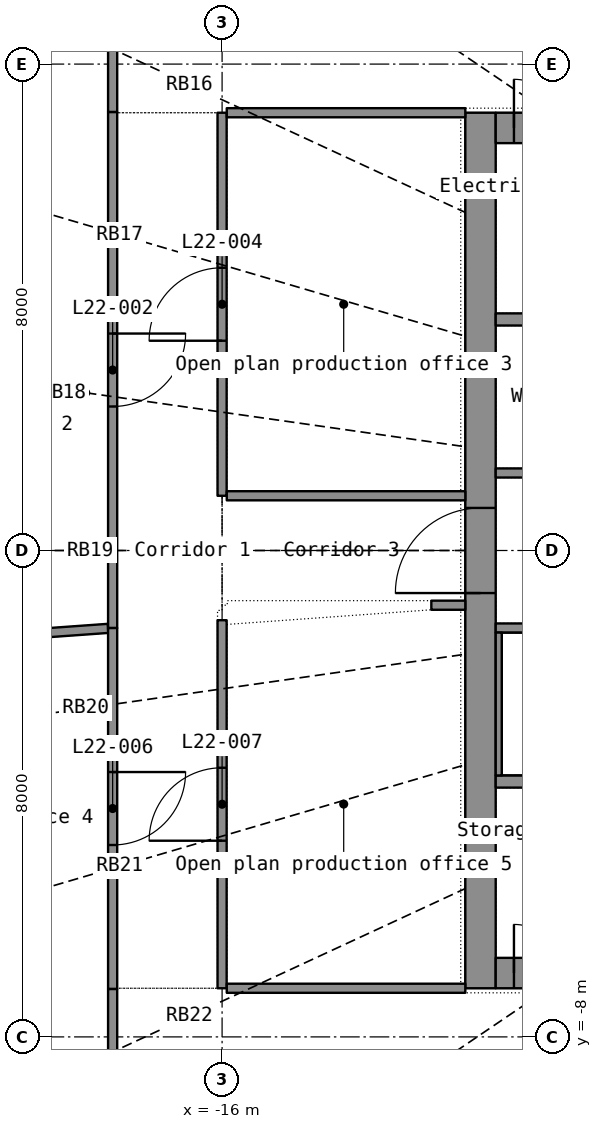
"""IFC4 building model, lengths in metres.
Left out: names, types, materials, properties, quantities, classifications, styles, units other than length and angle.
Written with IfcOpenShell. Run it as: python <this file> out.ifc"""

import sys

from ifc_helpers import new_model, si_unit, direction, frame, frame_2d, origin, place, context, subcontext, project, spatial, rectangle, extrude, element, fill, save


model = new_model("IFC4")
c1 = context("Model", 3, precision=1e-05, world=origin(), true_north=direction((0.0, 1.0)))
c2 = subcontext(c1, "Body", "Model", "MODEL_VIEW")
j1 = project(units=[si_unit("LENGTHUNIT", "METRE"), si_unit("PLANEANGLEUNIT", "RADIAN")], contexts=[c1])
p1 = place(None, origin())
s1 = spatial("IfcSite", under=j1, at=p1, CompositionType="ELEMENT")
p2 = place(p1, origin())
s2 = spatial("IfcBuilding", under=s1, at=p2, CompositionType="ELEMENT")
p3 = place(p2, frame((0.0, 0.0, 97.1)))
s3 = spatial("IfcBuildingStorey", under=s2, at=p3, CompositionType="ELEMENT", Elevation=97.1)
p4 = place(p3, frame((-11.75, -7.2, 0.0), z_axis=(0.0, 0.0, 1.0), x_axis=(0.0, 1.0, 0.0)))
e1 = element("IfcWall", 1, at=p4, inside=s3, PredefinedType="SHEAR", context=c2, shape_type="SweptSolid", body=[
    extrude(rectangle(XDim=14.4, YDim=0.5, at=frame_2d((7.2, 0.0))), origin(), (0.0, 0.0, 1.0), 3.3),
])
p5 = place(p4, frame((6.5, 0.0, 0.0)))
e2 = element("IfcOpeningElement", 2, at=p5, cuts=e1, PredefinedType="OPENING", context=c2, shape_type="SweptSolid", body=[
    extrude(rectangle(XDim=1.4, YDim=2.2, at=frame_2d((0.7, 1.1))), frame((0.0, 0.26, 0.0), z_axis=(0.0, -1.0, 0.0), x_axis=(1.0, 0.0, 0.0)), (0.0, 0.0, 1.0), 0.52),
])
p6 = place(p3, frame((-11.5, -6.95, 0.0), z_axis=(0.0, 0.0, 1.0), x_axis=(1.0, 0.0, 0.0)))
e3 = element("IfcWall", 3, at=p6, inside=s3, PredefinedType="SHEAR", context=c2, shape_type="SweptSolid", body=[
    extrude(rectangle(XDim=23.0, YDim=0.5, at=frame_2d((11.5, 0.0))), origin(), (0.0, 0.0, 1.0), 3.3),
])
p7 = place(p6, frame((1.95, 0.0, 0.0)))
e4 = element("IfcOpeningElement", 4, at=p7, cuts=e3, PredefinedType="OPENING", context=c2, shape_type="SweptSolid", body=[
    extrude(rectangle(XDim=1.1, YDim=2.2, at=frame_2d((0.55, 1.1))), frame((0.0, 0.26, 0.0), z_axis=(0.0, -1.0, 0.0), x_axis=(1.0, 0.0, 0.0)), (0.0, 0.0, 1.0), 0.52),
])
p8 = place(p6, frame((3.95, 0.0, 0.0)))
e5 = element("IfcOpeningElement", 5, at=p8, cuts=e3, PredefinedType="OPENING", context=c2, shape_type="SweptSolid", body=[
    extrude(rectangle(XDim=1.1, YDim=2.2, at=frame_2d((0.55, 1.1))), frame((0.0, 0.26, 0.0), z_axis=(0.0, -1.0, 0.0), x_axis=(1.0, 0.0, 0.0)), (0.0, 0.0, 1.0), 0.52),
])
p9 = place(p6, frame((5.95, 0.0, 0.0)))
e6 = element("IfcOpeningElement", 6, at=p9, cuts=e3, PredefinedType="OPENING", context=c2, shape_type="SweptSolid", body=[
    extrude(rectangle(XDim=1.1, YDim=2.2, at=frame_2d((0.55, 1.1))), frame((0.0, 0.26, 0.0), z_axis=(0.0, -1.0, 0.0), x_axis=(1.0, 0.0, 0.0)), (0.0, 0.0, 1.0), 0.52),
])
p10 = place(p6, frame((7.95, 0.0, 0.0)))
e7 = element("IfcOpeningElement", 7, at=p10, cuts=e3, PredefinedType="OPENING", context=c2, shape_type="SweptSolid", body=[
    extrude(rectangle(XDim=1.1, YDim=2.2, at=frame_2d((0.55, 1.1))), frame((0.0, 0.26, 0.0), z_axis=(0.0, -1.0, 0.0), x_axis=(1.0, 0.0, 0.0)), (0.0, 0.0, 1.0), 0.52),
])
p11 = place(p6, frame((9.95, 0.0, 0.0)))
e8 = element("IfcOpeningElement", 8, at=p11, cuts=e3, PredefinedType="OPENING", context=c2, shape_type="SweptSolid", body=[
    extrude(rectangle(XDim=1.1, YDim=2.2, at=frame_2d((0.55, 1.1))), frame((0.0, 0.26, 0.0), z_axis=(0.0, -1.0, 0.0), x_axis=(1.0, 0.0, 0.0)), (0.0, 0.0, 1.0), 0.52),
])
p12 = place(p6, frame((11.95, 0.0, 0.0)))
e9 = element("IfcOpeningElement", 9, at=p12, cuts=e3, PredefinedType="OPENING", context=c2, shape_type="SweptSolid", body=[
    extrude(rectangle(XDim=1.1, YDim=2.2, at=frame_2d((0.55, 1.1))), frame((0.0, 0.26, 0.0), z_axis=(0.0, -1.0, 0.0), x_axis=(1.0, 0.0, 0.0)), (0.0, 0.0, 1.0), 0.52),
])
p13 = place(p6, frame((13.95, 0.0, 0.0)))
e10 = element("IfcOpeningElement", 10, at=p13, cuts=e3, PredefinedType="OPENING", context=c2, shape_type="SweptSolid", body=[
    extrude(rectangle(XDim=1.1, YDim=2.2, at=frame_2d((0.55, 1.1))), frame((0.0, 0.26, 0.0), z_axis=(0.0, -1.0, 0.0), x_axis=(1.0, 0.0, 0.0)), (0.0, 0.0, 1.0), 0.52),
])
p14 = place(p6, frame((15.95, 0.0, 0.0)))
e11 = element("IfcOpeningElement", 11, at=p14, cuts=e3, PredefinedType="OPENING", context=c2, shape_type="SweptSolid", body=[
    extrude(rectangle(XDim=1.1, YDim=2.2, at=frame_2d((0.55, 1.1))), frame((0.0, 0.26, 0.0), z_axis=(0.0, -1.0, 0.0), x_axis=(1.0, 0.0, 0.0)), (0.0, 0.0, 1.0), 0.52),
])
p15 = place(p6, frame((19.95, 0.0, 0.0)))
e12 = element("IfcOpeningElement", 12, at=p15, cuts=e3, PredefinedType="OPENING", context=c2, shape_type="SweptSolid", body=[
    extrude(rectangle(XDim=1.1, YDim=2.2, at=frame_2d((0.55, 1.1))), frame((0.0, 0.26, 0.0), z_axis=(0.0, -1.0, 0.0), x_axis=(1.0, 0.0, 0.0)), (0.0, 0.0, 1.0), 0.52),
])
p16 = place(p6, frame((0.3, 0.0, 0.0)))
e13 = element("IfcOpeningElement", 13, at=p16, cuts=e3, PredefinedType="OPENING", context=c2, shape_type="SweptSolid", body=[
    extrude(rectangle(XDim=0.8, YDim=2.05, at=frame_2d((0.4, 1.025))), frame((0.0, 0.26, 0.0), z_axis=(0.0, -1.0, 0.0), x_axis=(1.0, 0.0, 0.0)), (0.0, 0.0, 1.0), 0.52),
])
p17 = place(p6, frame((21.9, 0.0, 0.0)))
e14 = element("IfcOpeningElement", 14, at=p17, cuts=e3, PredefinedType="OPENING", context=c2, shape_type="SweptSolid", body=[
    extrude(rectangle(XDim=0.8, YDim=2.05, at=frame_2d((0.4, 1.025))), frame((0.0, 0.26, 0.0), z_axis=(0.0, -1.0, 0.0), x_axis=(1.0, 0.0, 0.0)), (0.0, 0.0, 1.0), 0.52),
])
p18 = place(p3, frame((-11.5, 6.95, 0.0), z_axis=(0.0, 0.0, 1.0), x_axis=(1.0, 0.0, 0.0)))
e15 = element("IfcWall", 15, at=p18, inside=s3, PredefinedType="SHEAR", context=c2, shape_type="SweptSolid", body=[
    extrude(rectangle(XDim=23.0, YDim=0.5, at=frame_2d((11.5, 0.0))), origin(), (0.0, 0.0, 1.0), 3.3),
])
p19 = place(p18, frame((1.95, 0.0, 0.0)))
e16 = element("IfcOpeningElement", 16, at=p19, cuts=e15, PredefinedType="OPENING", context=c2, shape_type="SweptSolid", body=[
    extrude(rectangle(XDim=1.1, YDim=2.2, at=frame_2d((0.55, 1.1))), frame((0.0, 0.26, 0.0), z_axis=(0.0, -1.0, 0.0), x_axis=(1.0, 0.0, 0.0)), (0.0, 0.0, 1.0), 0.52),
])
p20 = place(p18, frame((8.05, 0.0, 0.0)))
e17 = element("IfcOpeningElement", 17, at=p20, cuts=e15, PredefinedType="OPENING", context=c2, shape_type="SweptSolid", body=[
    extrude(rectangle(XDim=0.9, YDim=2.1, at=frame_2d((0.45, 1.05))), frame((0.0, 0.26, 0.0), z_axis=(0.0, -1.0, 0.0), x_axis=(1.0, 0.0, 0.0)), (0.0, 0.0, 1.0), 0.52),
])
p21 = place(p18, frame((16.05, 0.0, 0.0)))
e18 = element("IfcOpeningElement", 18, at=p21, cuts=e15, PredefinedType="OPENING", context=c2, shape_type="SweptSolid", body=[
    extrude(rectangle(XDim=0.9, YDim=2.1, at=frame_2d((0.45, 1.05))), frame((0.0, 0.26, 0.0), z_axis=(0.0, -1.0, 0.0), x_axis=(1.0, 0.0, 0.0)), (0.0, 0.0, 1.0), 0.52),
])
p22 = place(p18, frame((0.3, 0.0, 0.0)))
e19 = element("IfcOpeningElement", 19, at=p22, cuts=e15, PredefinedType="OPENING", context=c2, shape_type="SweptSolid", body=[
    extrude(rectangle(XDim=0.8, YDim=2.05, at=frame_2d((0.4, 1.025))), frame((0.0, 0.26, 0.0), z_axis=(0.0, -1.0, 0.0), x_axis=(1.0, 0.0, 0.0)), (0.0, 0.0, 1.0), 0.52),
])
p23 = place(p18, frame((21.9, 0.0, 0.0)))
e20 = element("IfcOpeningElement", 20, at=p23, cuts=e15, PredefinedType="OPENING", context=c2, shape_type="SweptSolid", body=[
    extrude(rectangle(XDim=0.8, YDim=2.05, at=frame_2d((0.4, 1.025))), frame((0.0, 0.26, 0.0), z_axis=(0.0, -1.0, 0.0), x_axis=(1.0, 0.0, 0.0)), (0.0, 0.0, 1.0), 0.52),
])
for number, where, z_axis, x_axis in (
    (21, (-11.5, -3.8, 0.0), (0.0, 0.0, 1.0), (1.0, 0.0, 0.0)),
    (22, (-11.5, 3.8, 0.0), (0.0, 0.0, 1.0), (1.0, 0.0, 0.0)),
):
    element("IfcWall", number, at=place(p3, frame(where, z_axis=z_axis, x_axis=x_axis)), inside=s3, PredefinedType="SHEAR", context=c2, shape_type="SweptSolid", body=[
        extrude(rectangle(XDim=23.0, YDim=0.2, at=frame_2d((11.5, 0.0))), origin(), (0.0, 0.0, 1.0), 3.3),
    ])
p24 = place(p3, frame((-11.5, -1.275, 0.0), z_axis=(0.0, 0.0, 1.0), x_axis=(1.0, 0.0, 0.0)))
e23 = element("IfcWall", 23, at=p24, inside=s3, PredefinedType="SHEAR", context=c2, shape_type="SweptSolid", body=[
    extrude(rectangle(XDim=8.5, YDim=0.15, at=frame_2d((4.25, 0.0))), origin(), (0.0, 0.0, 1.0), 3.3),
])
p25 = place(p24, frame((5.35, 0.0, 0.0)))
e24 = element("IfcOpeningElement", 24, at=p25, cuts=e23, PredefinedType="OPENING", context=c2, shape_type="SweptSolid", body=[
    extrude(rectangle(XDim=1.1, YDim=2.15, at=frame_2d((0.55, 1.075))), frame((0.0, 0.085, 0.0), z_axis=(0.0, -1.0, 0.0), x_axis=(1.0, 0.0, 0.0)), (0.0, 0.0, 1.0), 0.17),
])
p26 = place(p24, frame((7.15, 0.0, 0.0)))
e25 = element("IfcOpeningElement", 25, at=p26, cuts=e23, PredefinedType="OPENING", context=c2, shape_type="SweptSolid", body=[
    extrude(rectangle(XDim=0.9, YDim=2.1, at=frame_2d((0.45, 1.05))), frame((0.0, 0.085, 0.0), z_axis=(0.0, -1.0, 0.0), x_axis=(1.0, 0.0, 0.0)), (0.0, 0.0, 1.0), 0.17),
])
p27 = place(p3, frame((-11.5, 1.275, 0.0), z_axis=(0.0, 0.0, 1.0), x_axis=(1.0, 0.0, 0.0)))
e26 = element("IfcWall", 26, at=p27, inside=s3, PredefinedType="PARTITIONING", context=c2, shape_type="SweptSolid", body=[
    extrude(rectangle(XDim=8.5, YDim=0.15, at=frame_2d((4.25, 0.0))), origin(), (0.0, 0.0, 1.0), 3.3),
])
p28 = place(p27, frame((0.782, 0.0, 0.0)))
e27 = element("IfcOpeningElement", 27, at=p28, cuts=e26, PredefinedType="OPENING", context=c2, shape_type="SweptSolid", body=[
    extrude(rectangle(XDim=0.85, YDim=2.1, at=frame_2d((0.425, 1.05))), frame((0.0, 0.085, 0.0), z_axis=(0.0, -1.0, 0.0), x_axis=(1.0, 0.0, 0.0)), (0.0, 0.0, 1.0), 0.17),
])
p29 = place(p27, frame((3.347, 0.0, 0.0)))
e28 = element("IfcOpeningElement", 28, at=p29, cuts=e26, PredefinedType="OPENING", context=c2, shape_type="SweptSolid", body=[
    extrude(rectangle(XDim=0.85, YDim=2.1, at=frame_2d((0.425, 1.05))), frame((0.0, 0.085, 0.0), z_axis=(0.0, -1.0, 0.0), x_axis=(1.0, 0.0, 0.0)), (0.0, 0.0, 1.0), 0.17),
])
p30 = place(p27, frame((5.485, 0.0, 0.0)))
e29 = element("IfcOpeningElement", 29, at=p30, cuts=e26, PredefinedType="OPENING", context=c2, shape_type="SweptSolid", body=[
    extrude(rectangle(XDim=0.9, YDim=2.1, at=frame_2d((0.45, 1.05))), frame((0.0, 0.085, 0.0), z_axis=(0.0, -1.0, 0.0), x_axis=(1.0, 0.0, 0.0)), (0.0, 0.0, 1.0), 0.17),
])
p31 = place(p27, frame((7.245, 0.0, 0.0)))
e30 = element("IfcOpeningElement", 30, at=p31, cuts=e26, PredefinedType="OPENING", context=c2, shape_type="SweptSolid", body=[
    extrude(rectangle(XDim=0.9, YDim=2.1, at=frame_2d((0.45, 1.05))), frame((0.0, 0.085, 0.0), z_axis=(0.0, -1.0, 0.0), x_axis=(1.0, 0.0, 0.0)), (0.0, 0.0, 1.0), 0.17),
])
p32 = place(p3, frame((-11.45, -3.7, 0.0), z_axis=(0.0, 0.0, 1.0), x_axis=(0.0, 1.0, 0.0)))
e31 = element("IfcWall", 31, at=p32, inside=s3, PredefinedType="SHEAR", context=c2, shape_type="SweptSolid", body=[
    extrude(rectangle(XDim=2.35, YDim=0.1, at=frame_2d((1.175, 0.0))), origin(), (0.0, 0.0, 1.0), 3.3),
])
p33 = place(p3, frame((-17.8, 7.212, 0.0), z_axis=(0.0, 0.0, 1.0), x_axis=(0.0, -1.0, 0.0)))
e32 = element("IfcWall", 32, at=p33, inside=s3, PredefinedType="PARTITIONING", context=c2, shape_type="SweptSolid", body=[
    extrude(rectangle(XDim=8.488, YDim=0.15, at=frame_2d((4.244, 0.0))), origin(), (0.0, 0.0, 1.0), 2.4),
])
p34 = place(p33, frame((3.644, 0.0, 0.0)))
e33 = element("IfcOpeningElement", 33, at=p34, cuts=e32, PredefinedType="OPENING", context=c2, shape_type="SweptSolid", body=[
    extrude(rectangle(XDim=1.2, YDim=2.2, at=frame_2d((0.6, 1.1))), frame((0.0, 0.085, 0.0), z_axis=(0.0, -1.0, 0.0), x_axis=(1.0, 0.0, 0.0)), (0.0, 0.0, 1.0), 0.17),
])
p35 = place(p3, frame((-25.771, -1.847, 0.0), z_axis=(0.0, 0.0, 1.0), x_axis=(0.997442231, 0.071477241, 0.0)))
e34 = element("IfcWall", 34, at=p35, inside=s3, PredefinedType="PARTITIONING", context=c2, shape_type="SweptSolid", body=[
    extrude(rectangle(XDim=7.914, YDim=0.15, at=frame_2d((3.957, 0.0))), origin(), (0.0, 0.0, 1.0), 2.4),
])
p36 = place(p3, frame((-16.0, 0.9, 0.0), z_axis=(0.0, 0.0, 1.0), x_axis=(0.0, 1.0, 0.0)))
e35 = element("IfcWall", 35, at=p36, inside=s3, PredefinedType="PARTITIONING", context=c2, shape_type="SweptSolid", body=[
    extrude(rectangle(XDim=6.3, YDim=0.15, at=frame_2d((3.15, 0.0))), origin(), (0.0, 0.0, 1.0), 2.4),
])
p37 = place(p36, frame((2.55, 0.0, 0.0)))
e36 = element("IfcOpeningElement", 36, at=p37, cuts=e35, PredefinedType="OPENING", context=c2, shape_type="SweptSolid", body=[
    extrude(rectangle(XDim=1.2, YDim=2.2, at=frame_2d((0.6, 1.1))), frame((0.0, 0.085, 0.0), z_axis=(0.0, -1.0, 0.0), x_axis=(1.0, 0.0, 0.0)), (0.0, 0.0, 1.0), 0.17),
])
p38 = place(p3, frame((-16.0, -7.2, 0.0), z_axis=(0.0, 0.0, 1.0), x_axis=(0.0, 1.0, 0.0)))
e37 = element("IfcWall", 37, at=p38, inside=s3, PredefinedType="PARTITIONING", context=c2, shape_type="SweptSolid", body=[
    extrude(rectangle(XDim=6.053, YDim=0.15, at=frame_2d((3.027, 0.0))), origin(), (0.0, 0.0, 1.0), 2.4),
])
p39 = place(p38, frame((2.427, 0.0, 0.0)))
e38 = element("IfcOpeningElement", 38, at=p39, cuts=e37, PredefinedType="OPENING", context=c2, shape_type="SweptSolid", body=[
    extrude(rectangle(XDim=1.2, YDim=2.2, at=frame_2d((0.6, 1.1))), frame((0.0, 0.085, 0.0), z_axis=(0.0, -1.0, 0.0), x_axis=(1.0, 0.0, 0.0)), (0.0, 0.0, 1.0), 0.17),
])
p40 = place(p3, frame((-17.8, -1.276, 0.0), z_axis=(0.0, 0.0, 1.0), x_axis=(0.0, -1.0, 0.0)))
e39 = element("IfcWall", 39, at=p40, inside=s3, PredefinedType="PARTITIONING", context=c2, shape_type="SweptSolid", body=[
    extrude(rectangle(XDim=5.936, YDim=0.15, at=frame_2d((2.968, 0.0))), origin(), (0.0, 0.0, 1.0), 2.4),
])
p41 = place(p40, frame((2.368, 0.0, 0.0)))
e40 = element("IfcOpeningElement", 40, at=p41, cuts=e39, PredefinedType="OPENING", context=c2, shape_type="SweptSolid", body=[
    extrude(rectangle(XDim=1.2, YDim=2.2, at=frame_2d((0.6, 1.1))), frame((0.0, 0.085, 0.0), z_axis=(0.0, -1.0, 0.0), x_axis=(1.0, 0.0, 0.0)), (0.0, 0.0, 1.0), 0.17),
])
for number, where, z_axis, x_axis in (
    (41, (-15.923, 7.2, 0.0), (0.0, 0.0, 1.0), (1.0, 0.0, 0.0)),
    (42, (-12.0, -7.2, 0.0), (0.0, 0.0, 1.0), (-1.0, 0.0, 0.0)),
    (43, (-12.0, 0.9, 0.0), (0.0, 0.0, 1.0), (-1.0, 0.0, 0.0)),
):
    element("IfcWall", number, at=place(p3, frame(where, z_axis=z_axis, x_axis=x_axis)), inside=s3, PredefinedType="PARTITIONING", context=c2, shape_type="SweptSolid", body=[
        extrude(rectangle(XDim=3.923, YDim=0.15, at=frame_2d((1.961, 0.0))), origin(), (0.0, 0.0, 1.0), 2.4),
    ])
for number, where, z_axis, x_axis in (
    (44, (-17.8, -7.213, 0.0), (0.0, 0.0, 1.0), (0.0, -1.0, 0.0)),
    (45, (-17.8, 10.123, 0.0), (0.0, 0.0, 1.0), (0.0, -1.0, 0.0)),
):
    element("IfcWall", number, at=place(p3, frame(where, z_axis=z_axis, x_axis=x_axis)), inside=s3, PredefinedType="PARTITIONING", context=c2, shape_type="SweptSolid", body=[
        extrude(rectangle(XDim=2.91, YDim=0.15, at=frame_2d((1.455, 0.0))), origin(), (0.0, 0.0, 1.0), 2.4),
    ])
p42 = place(p3, frame((-12.559, -0.9, 0.0), z_axis=(0.0, 0.0, 1.0), x_axis=(1.0, 0.0, 0.0)))
e46 = element("IfcWall", 46, at=p42, inside=s3, PredefinedType="PARTITIONING", context=c2, shape_type="SweptSolid", body=[
    extrude(rectangle(XDim=0.559, YDim=0.15, at=frame_2d((0.279, 0.0))), origin(), (0.0, 0.0, 1.0), 2.4),
])
p43 = place(p16, origin())
e47 = element("IfcDoor", 47, at=p43, inside=s3, OperationType="SINGLE_SWING_LEFT", PredefinedType="DOOR", context=c2, shape_type="SweptSolid", body=[
    extrude(rectangle(XDim=0.8, YDim=2.05, at=frame_2d((0.4, 1.025))), frame((0.0, 0.025, 0.0), z_axis=(0.0, -1.0, 0.0), x_axis=(1.0, 0.0, 0.0)), (0.0, 0.0, 1.0), 0.05),
])
fill(e13, e47)
p44 = place(p22, origin())
e48 = element("IfcDoor", 48, at=p44, inside=s3, OperationType="SINGLE_SWING_LEFT", PredefinedType="DOOR", context=c2, shape_type="SweptSolid", body=[
    extrude(rectangle(XDim=0.8, YDim=2.05, at=frame_2d((0.4, 1.025))), frame((0.0, 0.025, 0.0), z_axis=(0.0, -1.0, 0.0), x_axis=(1.0, 0.0, 0.0)), (0.0, 0.0, 1.0), 0.05),
])
fill(e19, e48)
p45 = place(p5, origin())
e49 = element("IfcDoor", 49, at=p45, inside=s3, OperationType="DOUBLE_DOOR_SINGLE_SWING", PredefinedType="DOOR", context=c2, shape_type="SweptSolid", body=[
    extrude(rectangle(XDim=1.4, YDim=2.2, at=frame_2d((0.7, 1.1))), frame((0.0, 0.025, 0.0), z_axis=(0.0, -1.0, 0.0), x_axis=(1.0, 0.0, 0.0)), (0.0, 0.0, 1.0), 0.05),
])
fill(e2, e49)
p46 = place(p34, origin())
e50 = element("IfcDoor", 50, at=p46, inside=s3, OperationType="DOUBLE_DOOR_SINGLE_SWING", PredefinedType="DOOR", context=c2, shape_type="SweptSolid", body=[
    extrude(rectangle(XDim=1.2, YDim=2.2, at=frame_2d((0.6, 1.1))), frame((0.0, 0.025, 0.0), z_axis=(0.0, -1.0, 0.0), x_axis=(1.0, 0.0, 0.0)), (0.0, 0.0, 1.0), 0.05),
])
fill(e33, e50)
p47 = place(p37, origin())
e51 = element("IfcDoor", 51, at=p47, inside=s3, OperationType="DOUBLE_DOOR_SINGLE_SWING", PredefinedType="DOOR", context=c2, shape_type="SweptSolid", body=[
    extrude(rectangle(XDim=1.2, YDim=2.2, at=frame_2d((0.6, 1.1))), frame((0.0, 0.025, 0.0), z_axis=(0.0, -1.0, 0.0), x_axis=(1.0, 0.0, 0.0)), (0.0, 0.0, 1.0), 0.05),
])
fill(e36, e51)
p48 = place(p41, origin())
e52 = element("IfcDoor", 52, at=p48, inside=s3, OperationType="DOUBLE_DOOR_SINGLE_SWING", PredefinedType="DOOR", context=c2, shape_type="SweptSolid", body=[
    extrude(rectangle(XDim=1.2, YDim=2.2, at=frame_2d((0.6, 1.1))), frame((0.0, 0.025, 0.0), z_axis=(0.0, -1.0, 0.0), x_axis=(1.0, 0.0, 0.0)), (0.0, 0.0, 1.0), 0.05),
])
fill(e40, e52)
p49 = place(p39, origin())
e53 = element("IfcDoor", 53, at=p49, inside=s3, OperationType="DOUBLE_DOOR_SINGLE_SWING", PredefinedType="DOOR", context=c2, shape_type="SweptSolid", body=[
    extrude(rectangle(XDim=1.2, YDim=2.2, at=frame_2d((0.6, 1.1))), frame((0.0, 0.025, 0.0), z_axis=(0.0, -1.0, 0.0), x_axis=(1.0, 0.0, 0.0)), (0.0, 0.0, 1.0), 0.05),
])
fill(e38, e53)
save(model, sys.argv[1])
